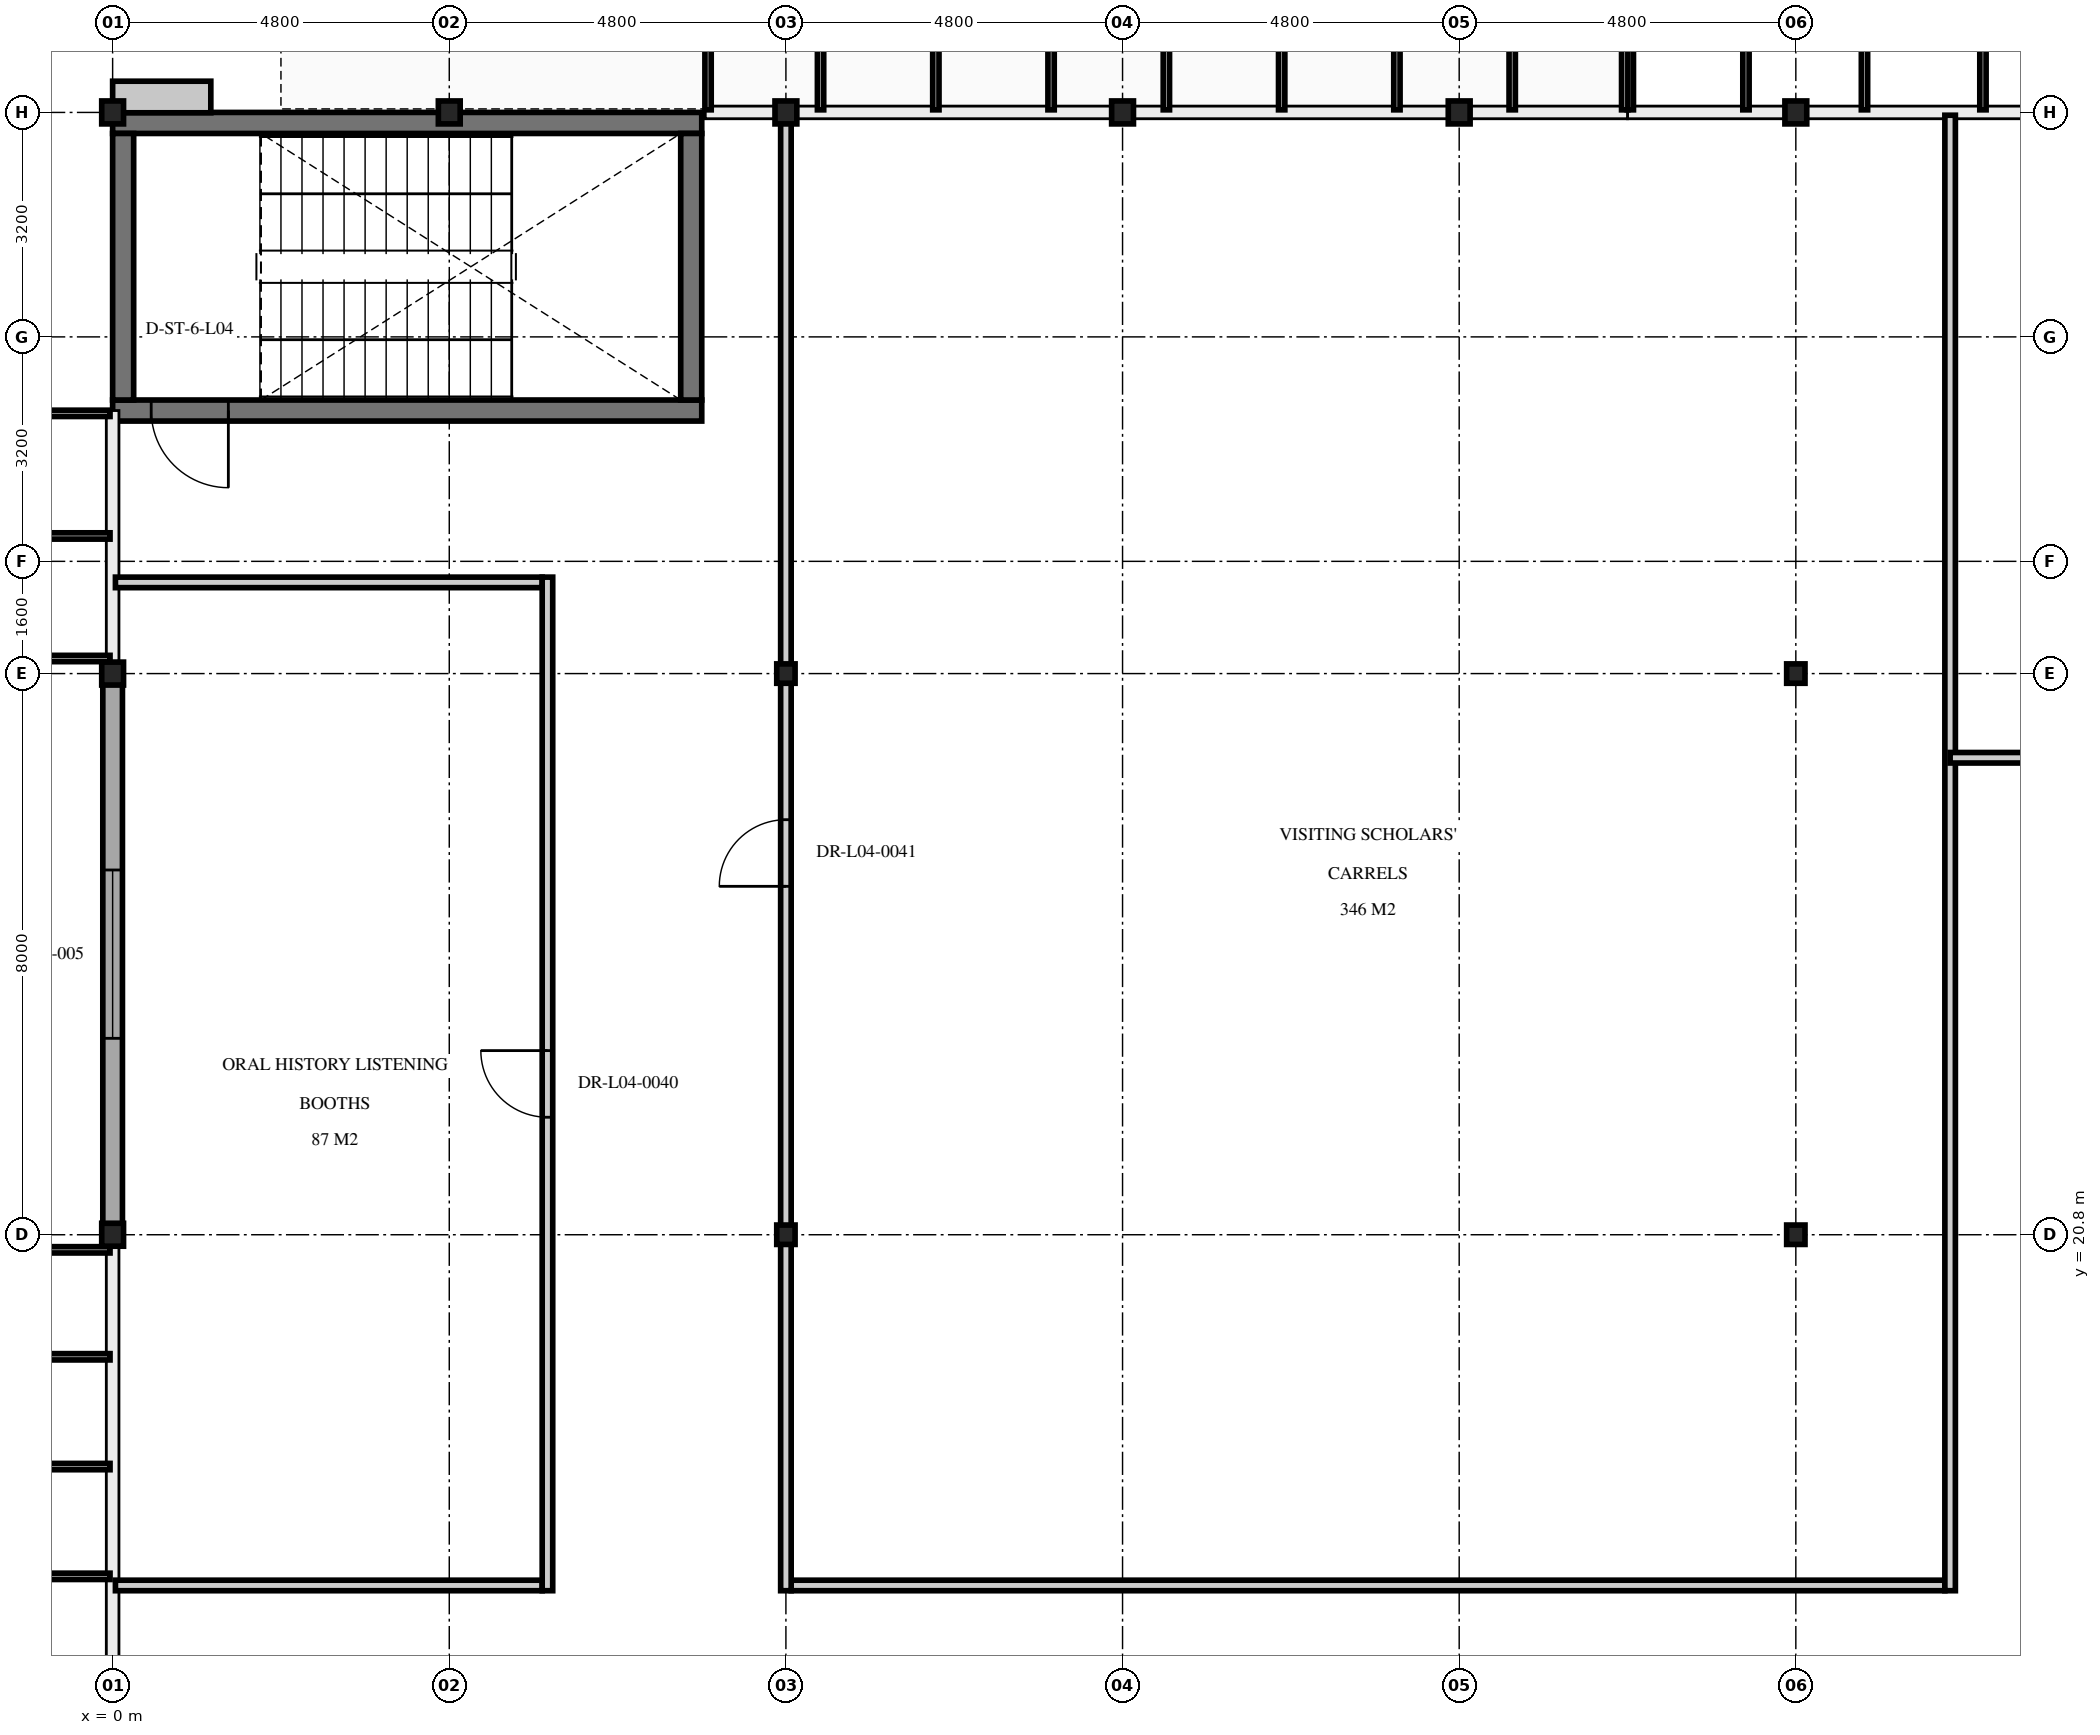
"""IFC4 building model, lengths in metres.
Left out: names, types, materials, properties, quantities, classifications, styles, units other than length and angle.
Written with IfcOpenShell. Run it as: python <this file> out.ifc"""

import sys

from ifc_helpers import new_model, si_unit, direction, frame, frame_2d, origin, origin_2d, place, context, subcontext, project, spatial, rectangle, i_section, extrude, element, fill, save


model = new_model("IFC4")
c1 = context("Model", 3, precision=1e-05, world=origin(), true_north=direction((0.0, 1.0)))
c2 = subcontext(c1, "Body", "Model", "MODEL_VIEW")
j1 = project(units=[si_unit("LENGTHUNIT", "METRE"), si_unit("PLANEANGLEUNIT", "RADIAN")], contexts=[c1])
p1 = place(None, origin())
s1 = spatial("IfcSite", under=j1, at=p1, CompositionType="ELEMENT")
p2 = place(p1, origin())
s2 = spatial("IfcBuilding", under=s1, at=p2, CompositionType="ELEMENT")
p3 = place(p2, frame((0.0, 0.0, 18.6)))
s3 = spatial("IfcBuildingStorey", under=s2, at=p3, CompositionType="ELEMENT", Elevation=18.6)
for number, where, z_axis, x_axis in (
    (1, (0.0, 36.8, 0.0), (0.0, 0.0, 1.0), (1.0, 0.0, 0.0)),
    (2, (4.8, 36.8, 0.0), (0.0, 0.0, 1.0), (1.0, 0.0, 0.0)),
    (3, (9.6, 36.8, 0.0), (0.0, 0.0, 1.0), (1.0, 0.0, 0.0)),
    (4, (14.4, 36.8, 0.0), (0.0, 0.0, 1.0), (1.0, 0.0, 0.0)),
    (5, (19.2, 36.8, 0.0), (0.0, 0.0, 1.0), (1.0, 0.0, 0.0)),
    (6, (24.0, 36.8, 0.0), (0.0, 0.0, 1.0), (1.0, 0.0, 0.0)),
    (7, (0.0, 20.8, 0.0), (0.0, 0.0, 1.0), (1.0, 0.0, 0.0)),
    (8, (0.0, 28.8, 0.0), (0.0, 0.0, 1.0), (1.0, 0.0, 0.0)),
):
    element("IfcColumn", number, at=place(p3, frame(where, z_axis=z_axis, x_axis=x_axis)), inside=s3, PredefinedType="COLUMN", context=c2, shape_type="SweptSolid", body=[
        extrude(i_section(OverallWidth=0.311, OverallDepth=0.327, WebThickness=0.016, FlangeThickness=0.025, at=origin_2d()), origin(), (0.0, 0.0, 1.0), 4.5),
    ])
for number, where, z_axis, x_axis in (
    (9, (9.6, 20.8, 0.0), (0.0, 0.0, 1.0), (1.0, 0.0, 0.0)),
    (10, (9.6, 28.8, 0.0), (0.0, 0.0, 1.0), (1.0, 0.0, 0.0)),
    (11, (24.0, 20.8, 0.0), (0.0, 0.0, 1.0), (1.0, 0.0, 0.0)),
    (12, (24.0, 28.8, 0.0), (0.0, 0.0, 1.0), (1.0, 0.0, 0.0)),
):
    element("IfcColumn", number, at=place(p3, frame(where, z_axis=z_axis, x_axis=x_axis)), inside=s3, PredefinedType="COLUMN", context=c2, shape_type="SweptSolid", body=[
        extrude(i_section(OverallWidth=0.261, OverallDepth=0.276, WebThickness=0.015, FlangeThickness=0.025, at=origin_2d()), origin(), (0.0, 0.0, 1.0), 4.5),
    ])
p4 = place(p3, frame((8.4, 32.55, 0.0), z_axis=(0.0, 0.0, 1.0), x_axis=(-1.0, 0.0, 0.0)))
e13 = element("IfcWall", 13, at=p4, inside=s3, PredefinedType="SHEAR", context=c2, shape_type="SweptSolid", body=[
    extrude(rectangle(XDim=8.4, YDim=0.3, at=frame_2d((4.2, 0.0))), origin(), (0.0, 0.0, 1.0), 4.28),
])
p5 = place(p4, frame((6.75, 0.0, 0.0)))
e14 = element("IfcOpeningElement", 14, at=p5, cuts=e13, PredefinedType="OPENING", context=c2, shape_type="SweptSolid", body=[
    extrude(rectangle(XDim=1.1, YDim=2.2, at=frame_2d((0.55, 1.1))), frame((0.0, 0.16, 0.0), z_axis=(0.0, -1.0, 0.0), x_axis=(1.0, 0.0, 0.0)), (0.0, 0.0, 1.0), 0.32),
])
p6 = place(p3, frame((0.0, 36.65, 0.0), z_axis=(0.0, 0.0, 1.0), x_axis=(1.0, 0.0, 0.0)))
e15 = element("IfcWall", 15, at=p6, inside=s3, PredefinedType="SHEAR", context=c2, shape_type="SweptSolid", body=[
    extrude(rectangle(XDim=8.4, YDim=0.3, at=frame_2d((4.2, 0.0))), origin(), (0.0, 0.0, 1.0), 4.28),
])
for number, where, z_axis, x_axis in (
    (16, (0.15, 32.7, 0.0), (0.0, 0.0, 1.0), (0.0, 1.0, 0.0)),
    (17, (8.25, 36.5, 0.0), (0.0, 0.0, 1.0), (0.0, -1.0, 0.0)),
):
    element("IfcWall", number, at=place(p3, frame(where, z_axis=z_axis, x_axis=x_axis)), inside=s3, PredefinedType="SHEAR", context=c2, shape_type="SweptSolid", body=[
        extrude(rectangle(XDim=3.8, YDim=0.3, at=frame_2d((1.9, 0.0))), origin(), (0.0, 0.0, 1.0), 4.28),
    ])
p7 = place(p3, frame((0.0, 20.715, 0.0), z_axis=(0.0, 0.0, 1.0), x_axis=(0.0, 1.0, 0.0)))
e18 = element("IfcWall", 18, at=p7, inside=s3, PredefinedType="SOLIDWALL", context=c2, shape_type="SweptSolid", body=[
    extrude(rectangle(XDim=8.17, YDim=0.28, at=frame_2d((4.085, 0.0))), origin(), (0.0, 0.0, 1.0), 3.665),
])
p8 = place(p7, frame((2.885, 0.0, 0.95)))
e19 = element("IfcOpeningElement", 19, at=p8, cuts=e18, PredefinedType="OPENING", context=c2, shape_type="SweptSolid", body=[
    extrude(rectangle(XDim=2.4, YDim=2.1, at=frame_2d((1.2, 1.05))), frame((0.0, 0.15, 0.0), z_axis=(0.0, -1.0, 0.0), x_axis=(1.0, 0.0, 0.0)), (0.0, 0.0, 1.0), 0.3),
])
for number, where, z_axis, x_axis in (
    (20, (0.04, 15.8, 0.0), (0.0, 0.0, 1.0), (1.0, 0.0, 0.0)),
    (21, (0.04, 30.1, 0.0), (0.0, 0.0, 1.0), (1.0, 0.0, 0.0)),
):
    element("IfcWall", number, at=place(p3, frame(where, z_axis=z_axis, x_axis=x_axis)), inside=s3, PredefinedType="PARTITIONING", context=c2, shape_type="SweptSolid", body=[
        extrude(rectangle(XDim=6.085, YDim=0.15, at=frame_2d((3.042, 0.0))), origin(), (0.0, 0.0, 1.0), 3.711),
    ])
p9 = place(p3, frame((6.2, 15.725, 0.0), z_axis=(0.0, 0.0, 1.0), x_axis=(0.0, 1.0, 0.0)))
e22 = element("IfcWall", 22, at=p9, inside=s3, PredefinedType="PARTITIONING", context=c2, shape_type="SweptSolid", body=[
    extrude(rectangle(XDim=14.45, YDim=0.15, at=frame_2d((7.225, 0.0))), origin(), (0.0, 0.0, 1.0), 3.665),
])
p10 = place(p9, frame((6.75, 0.0, 0.0)))
e23 = element("IfcOpeningElement", 23, at=p10, cuts=e22, PredefinedType="OPENING", context=c2, shape_type="SweptSolid", body=[
    extrude(rectangle(XDim=0.95, YDim=2.15, at=frame_2d((0.475, 1.075))), frame((0.0, 0.085, 0.0), z_axis=(0.0, -1.0, 0.0), x_axis=(1.0, 0.0, 0.0)), (0.0, 0.0, 1.0), 0.17),
])
p11 = place(p3, frame((9.675, 15.8, 0.0), z_axis=(0.0, 0.0, 1.0), x_axis=(1.0, 0.0, 0.0)))
e24 = element("IfcWall", 24, at=p11, inside=s3, PredefinedType="PARTITIONING", context=c2, shape_type="SweptSolid", body=[
    extrude(rectangle(XDim=16.45, YDim=0.15, at=frame_2d((8.225, 0.0))), origin(), (0.0, 0.0, 1.0), 3.711),
])
p12 = place(p3, frame((9.6, 15.725, 0.0), z_axis=(0.0, 0.0, 1.0), x_axis=(0.0, 1.0, 0.0)))
e25 = element("IfcWall", 25, at=p12, inside=s3, PredefinedType="PARTITIONING", context=c2, shape_type="SweptSolid", body=[
    extrude(rectangle(XDim=21.035, YDim=0.15, at=frame_2d((10.518, 0.0))), origin(), (0.0, 0.0, 1.0), 3.665),
])
p13 = place(p12, frame((10.042, 0.0, 0.0)))
e26 = element("IfcOpeningElement", 26, at=p13, cuts=e25, PredefinedType="OPENING", context=c2, shape_type="SweptSolid", body=[
    extrude(rectangle(XDim=0.95, YDim=2.15, at=frame_2d((0.475, 1.075))), frame((0.0, 0.085, 0.0), z_axis=(0.0, -1.0, 0.0), x_axis=(1.0, 0.0, 0.0)), (0.0, 0.0, 1.0), 0.17),
])
p14 = place(p3, frame((26.2, 15.725, 0.0), z_axis=(0.0, 0.0, 1.0), x_axis=(0.0, 1.0, 0.0)))
e27 = element("IfcWall", 27, at=p14, inside=s3, PredefinedType="PARTITIONING", context=c2, shape_type="SweptSolid", body=[
    extrude(rectangle(XDim=21.035, YDim=0.15, at=frame_2d((10.518, 0.0))), origin(), (0.0, 0.0, 1.0), 3.665),
])
p15 = place(p3, frame((26.2, 27.6, 0.0), z_axis=(0.0, 0.0, 1.0), x_axis=(1.0, 0.0, 0.0)))
e28 = element("IfcWall", 28, at=p15, inside=s3, PredefinedType="PARTITIONING", context=c2, shape_type="SweptSolid", body=[
    extrude(rectangle(XDim=7.36, YDim=0.15, at=frame_2d((3.68, 0.0))), origin(), (0.0, 0.0, 1.0), 3.711),
])
p16 = place(p15, frame((1.41, 0.0, 0.0)))
e29 = element("IfcOpeningElement", 29, at=p16, cuts=e28, PredefinedType="OPENING", context=c2, shape_type="SweptSolid", body=[
    extrude(rectangle(XDim=0.95, YDim=2.15, at=frame_2d((0.475, 1.075))), frame((0.0, 0.085, 0.0), z_axis=(0.0, -1.0, 0.0), x_axis=(1.0, 0.0, 0.0)), (0.0, 0.0, 1.0), 0.17),
])
p17 = place(p5, origin())
e30 = element("IfcDoor", 30, at=p17, inside=s3, OperationType="SINGLE_SWING_LEFT", PredefinedType="DOOR", context=c2, shape_type="SweptSolid", body=[
    extrude(rectangle(XDim=1.1, YDim=2.2, at=frame_2d((0.55, 1.1))), frame((0.0, 0.025, 0.0), z_axis=(0.0, -1.0, 0.0), x_axis=(1.0, 0.0, 0.0)), (0.0, 0.0, 1.0), 0.05),
])
fill(e14, e30)
p18 = place(p8, origin())
e31 = element("IfcWindow", 31, at=p18, inside=s3, PartitioningType="SINGLE_PANEL", PredefinedType="WINDOW", context=c2, shape_type="SweptSolid", body=[
    extrude(rectangle(XDim=2.4, YDim=2.1, at=frame_2d((1.2, 1.05))), frame((0.0, 0.03, 0.0), z_axis=(0.0, -1.0, 0.0), x_axis=(1.0, 0.0, 0.0)), (0.0, 0.0, 1.0), 0.06),
])
fill(e19, e31)
p19 = place(p10, origin())
e32 = element("IfcDoor", 32, at=p19, inside=s3, OperationType="SINGLE_SWING_RIGHT", PredefinedType="DOOR", context=c2, shape_type="SweptSolid", body=[
    extrude(rectangle(XDim=0.95, YDim=2.15, at=frame_2d((0.475, 1.075))), frame((0.0, 0.025, 0.0), z_axis=(0.0, -1.0, 0.0), x_axis=(1.0, 0.0, 0.0)), (0.0, 0.0, 1.0), 0.05),
])
fill(e23, e32)
p20 = place(p13, origin())
e33 = element("IfcDoor", 33, at=p20, inside=s3, OperationType="SINGLE_SWING_LEFT", PredefinedType="DOOR", context=c2, shape_type="SweptSolid", body=[
    extrude(rectangle(XDim=0.95, YDim=2.15, at=frame_2d((0.475, 1.075))), frame((0.0, 0.025, 0.0), z_axis=(0.0, -1.0, 0.0), x_axis=(1.0, 0.0, 0.0)), (0.0, 0.0, 1.0), 0.05),
])
fill(e26, e33)
save(model, sys.argv[1])
